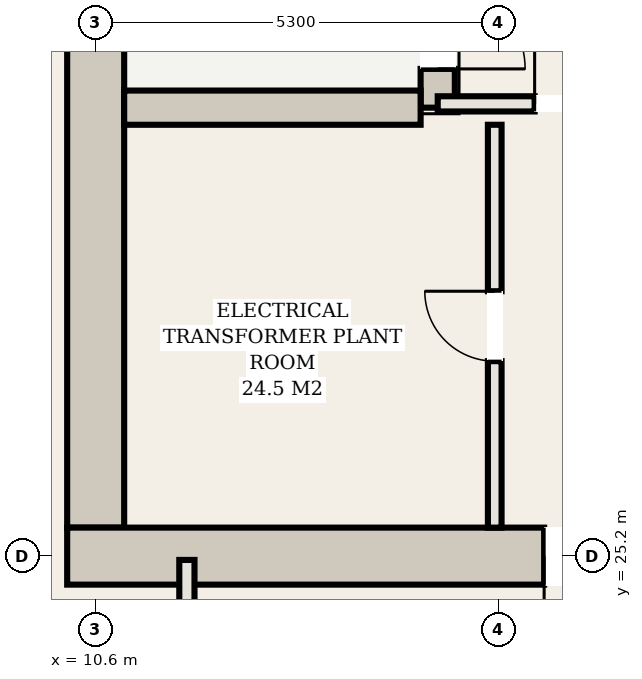
"""IFC4 building model, lengths in metres.
Left out: names, types, materials, properties, quantities, classifications, styles, units other than length and angle.
Written with IfcOpenShell. Run it as: python <this file> out.ifc"""

import sys

from ifc_helpers import new_model, si_unit, direction, frame, frame_2d, origin, place, context, subcontext, project, spatial, rectangle, extrude, element, fill, save


model = new_model("IFC4")
c1 = context("Model", 3, precision=1e-05, world=origin(), true_north=direction((0.0, 1.0)))
c2 = subcontext(c1, "Body", "Model", "MODEL_VIEW")
j1 = project(units=[si_unit("LENGTHUNIT", "METRE"), si_unit("PLANEANGLEUNIT", "RADIAN")], contexts=[c1])
p1 = place(None, origin())
s1 = spatial("IfcSite", under=j1, at=p1, CompositionType="ELEMENT")
p2 = place(p1, origin())
s2 = spatial("IfcBuilding", under=s1, at=p2, CompositionType="ELEMENT")
p3 = place(p2, frame((0.0, 0.0, 70.4)))
s3 = spatial("IfcBuildingStorey", under=s2, at=p3, CompositionType="ELEMENT", Elevation=70.4)
p4 = place(p3, frame((10.6, 25.575, 0.0), z_axis=(0.0, 0.0, 1.0), x_axis=(0.0, 1.0, 0.0)))
e1 = element("IfcWall", 1, at=p4, inside=s3, PredefinedType="SHEAR", context=c2, shape_type="SweptSolid", body=[
    extrude(rectangle(XDim=14.05, YDim=0.75, at=frame_2d((7.025, 0.0))), origin(), (0.0, 0.0, 1.0), 6.56),
])
p5 = place(p3, frame((10.225, 25.2, 0.0), z_axis=(0.0, 0.0, 1.0), x_axis=(1.0, 0.0, 0.0)))
e2 = element("IfcWall", 2, at=p5, inside=s3, PredefinedType="SHEAR", context=c2, shape_type="SweptSolid", body=[
    extrude(rectangle(XDim=8.175, YDim=0.75, at=frame_2d((4.087, 0.0))), origin(), (0.0, 0.0, 1.0), 6.56),
])
p6 = place(p5, frame((6.275, 0.0, 0.0)))
e3 = element("IfcOpeningElement", 3, at=p6, cuts=e2, PredefinedType="OPENING", context=c2, shape_type="SweptSolid", body=[
    extrude(rectangle(XDim=1.25, YDim=2.2, at=frame_2d((0.625, 1.1))), frame((0.0, 0.385, 0.0), z_axis=(0.0, -1.0, 0.0), x_axis=(1.0, 0.0, 0.0)), (0.0, 0.0, 1.0), 0.77),
])
p7 = place(p3, frame((15.1, 31.1, 0.0), z_axis=(0.0, 0.0, 1.0), x_axis=(0.0, 1.0, 0.0)))
e4 = element("IfcWall", 4, at=p7, inside=s3, PredefinedType="SHEAR", context=c2, shape_type="SweptSolid", body=[
    extrude(rectangle(XDim=8.525, YDim=0.45, at=frame_2d((4.262, 0.0))), origin(), (0.0, 0.0, 1.0), 6.56),
])
p8 = place(p7, frame((0.51, 0.0, 0.0)))
e5 = element("IfcOpeningElement", 5, at=p8, cuts=e4, PredefinedType="OPENING", context=c2, shape_type="SweptSolid", body=[
    extrude(rectangle(XDim=1.15, YDim=2.2, at=frame_2d((0.575, 1.1))), frame((0.0, 0.235, 0.0), z_axis=(0.0, -1.0, 0.0), x_axis=(1.0, 0.0, 0.0)), (0.0, 0.0, 1.0), 0.47),
])
p9 = place(p3, frame((10.975, 31.1, 0.0), z_axis=(0.0, 0.0, 1.0), x_axis=(1.0, 0.0, 0.0)))
e6 = element("IfcWall", 6, at=p9, inside=s3, PredefinedType="SHEAR", context=c2, shape_type="SweptSolid", body=[
    extrude(rectangle(XDim=3.9, YDim=0.45, at=frame_2d((1.95, 0.0))), origin(), (0.0, 0.0, 1.0), 6.56),
])
p10 = place(p3, frame((15.1, 31.15, 0.0), z_axis=(0.0, 0.0, 1.0), x_axis=(1.0, 0.0, 0.0)))
e7 = element("IfcWall", 7, at=p10, inside=s3, PredefinedType="PARTITIONING", context=c2, shape_type="SweptSolid", body=[
    extrude(rectangle(XDim=3.25, YDim=0.2, at=frame_2d((1.625, 0.0))), origin(), (0.0, 0.0, 1.0), 6.56),
])
p11 = place(p10, frame((1.275, 0.0, 0.0)))
e8 = element("IfcOpeningElement", 8, at=p11, cuts=e7, PredefinedType="OPENING", context=c2, shape_type="SweptSolid", body=[
    extrude(rectangle(XDim=1.25, YDim=2.2, at=frame_2d((0.625, 1.1))), frame((0.0, 0.11, 0.0), z_axis=(0.0, -1.0, 0.0), x_axis=(1.0, 0.0, 0.0)), (0.0, 0.0, 1.0), 0.22),
])
p12 = place(p3, frame((15.85, 25.575, 0.0), z_axis=(0.0, 0.0, 1.0), x_axis=(0.0, 1.0, 0.0)))
e9 = element("IfcWall", 9, at=p12, inside=s3, PredefinedType="PARTITIONING", context=c2, shape_type="SweptSolid", body=[
    extrude(rectangle(XDim=5.3, YDim=0.18, at=frame_2d((2.65, 0.0))), origin(), (0.0, 0.0, 1.0), 5.055),
])
p13 = place(p12, frame((2.19, 0.0, 0.0)))
e10 = element("IfcOpeningElement", 10, at=p13, cuts=e9, PredefinedType="OPENING", context=c2, shape_type="SweptSolid", body=[
    extrude(rectangle(XDim=0.92, YDim=2.15, at=frame_2d((0.46, 1.075))), frame((0.0, 0.1, 0.0), z_axis=(0.0, -1.0, 0.0), x_axis=(1.0, 0.0, 0.0)), (0.0, 0.0, 1.0), 0.2),
])
p14 = place(p3, frame((11.8, 22.4, 0.0), z_axis=(0.0, 0.0, 1.0), x_axis=(0.0, 1.0, 0.0)))
e11 = element("IfcWall", 11, at=p14, inside=s3, PredefinedType="PARTITIONING", context=c2, shape_type="SweptSolid", body=[
    extrude(rectangle(XDim=2.75, YDim=0.2, at=frame_2d((1.375, 0.0))), origin(), (0.0, 0.0, 1.0), 6.56),
])
p15 = place(p6, frame((1.25, 0.0, 0.0), z_axis=(0.0, 0.0, 1.0), x_axis=(-1.0, 0.0, 0.0)))
e12 = element("IfcDoor", 12, at=p15, inside=s3, OperationType="SINGLE_SWING_RIGHT", PredefinedType="DOOR", context=c2, shape_type="SweptSolid", body=[
    extrude(rectangle(XDim=1.25, YDim=2.2, at=frame_2d((0.625, 1.1))), frame((0.0, 0.025, 0.0), z_axis=(0.0, -1.0, 0.0), x_axis=(1.0, 0.0, 0.0)), (0.0, 0.0, 1.0), 0.05),
])
fill(e3, e12)
p16 = place(p11, origin())
e13 = element("IfcDoor", 13, at=p16, inside=s3, OperationType="SINGLE_SWING_LEFT", PredefinedType="DOOR", context=c2, shape_type="SweptSolid", body=[
    extrude(rectangle(XDim=1.25, YDim=2.2, at=frame_2d((0.625, 1.1))), frame((0.0, 0.025, 0.0), z_axis=(0.0, -1.0, 0.0), x_axis=(1.0, 0.0, 0.0)), (0.0, 0.0, 1.0), 0.05),
])
fill(e8, e13)
p17 = place(p8, frame((1.15, 0.0, 0.0), z_axis=(0.0, 0.0, 1.0), x_axis=(-1.0, 0.0, 0.0)))
e14 = element("IfcDoor", 14, at=p17, inside=s3, OperationType="SINGLE_SWING_RIGHT", PredefinedType="DOOR", context=c2, shape_type="SweptSolid", body=[
    extrude(rectangle(XDim=1.15, YDim=2.2, at=frame_2d((0.575, 1.1))), frame((0.0, 0.025, 0.0), z_axis=(0.0, -1.0, 0.0), x_axis=(1.0, 0.0, 0.0)), (0.0, 0.0, 1.0), 0.05),
])
fill(e5, e14)
p18 = place(p13, origin())
e15 = element("IfcDoor", 15, at=p18, inside=s3, OperationType="SINGLE_SWING_RIGHT", PredefinedType="DOOR", context=c2, shape_type="SweptSolid", body=[
    extrude(rectangle(XDim=0.92, YDim=2.15, at=frame_2d((0.46, 1.075))), frame((0.0, 0.025, 0.0), z_axis=(0.0, -1.0, 0.0), x_axis=(1.0, 0.0, 0.0)), (0.0, 0.0, 1.0), 0.05),
])
fill(e10, e15)
save(model, sys.argv[1])
